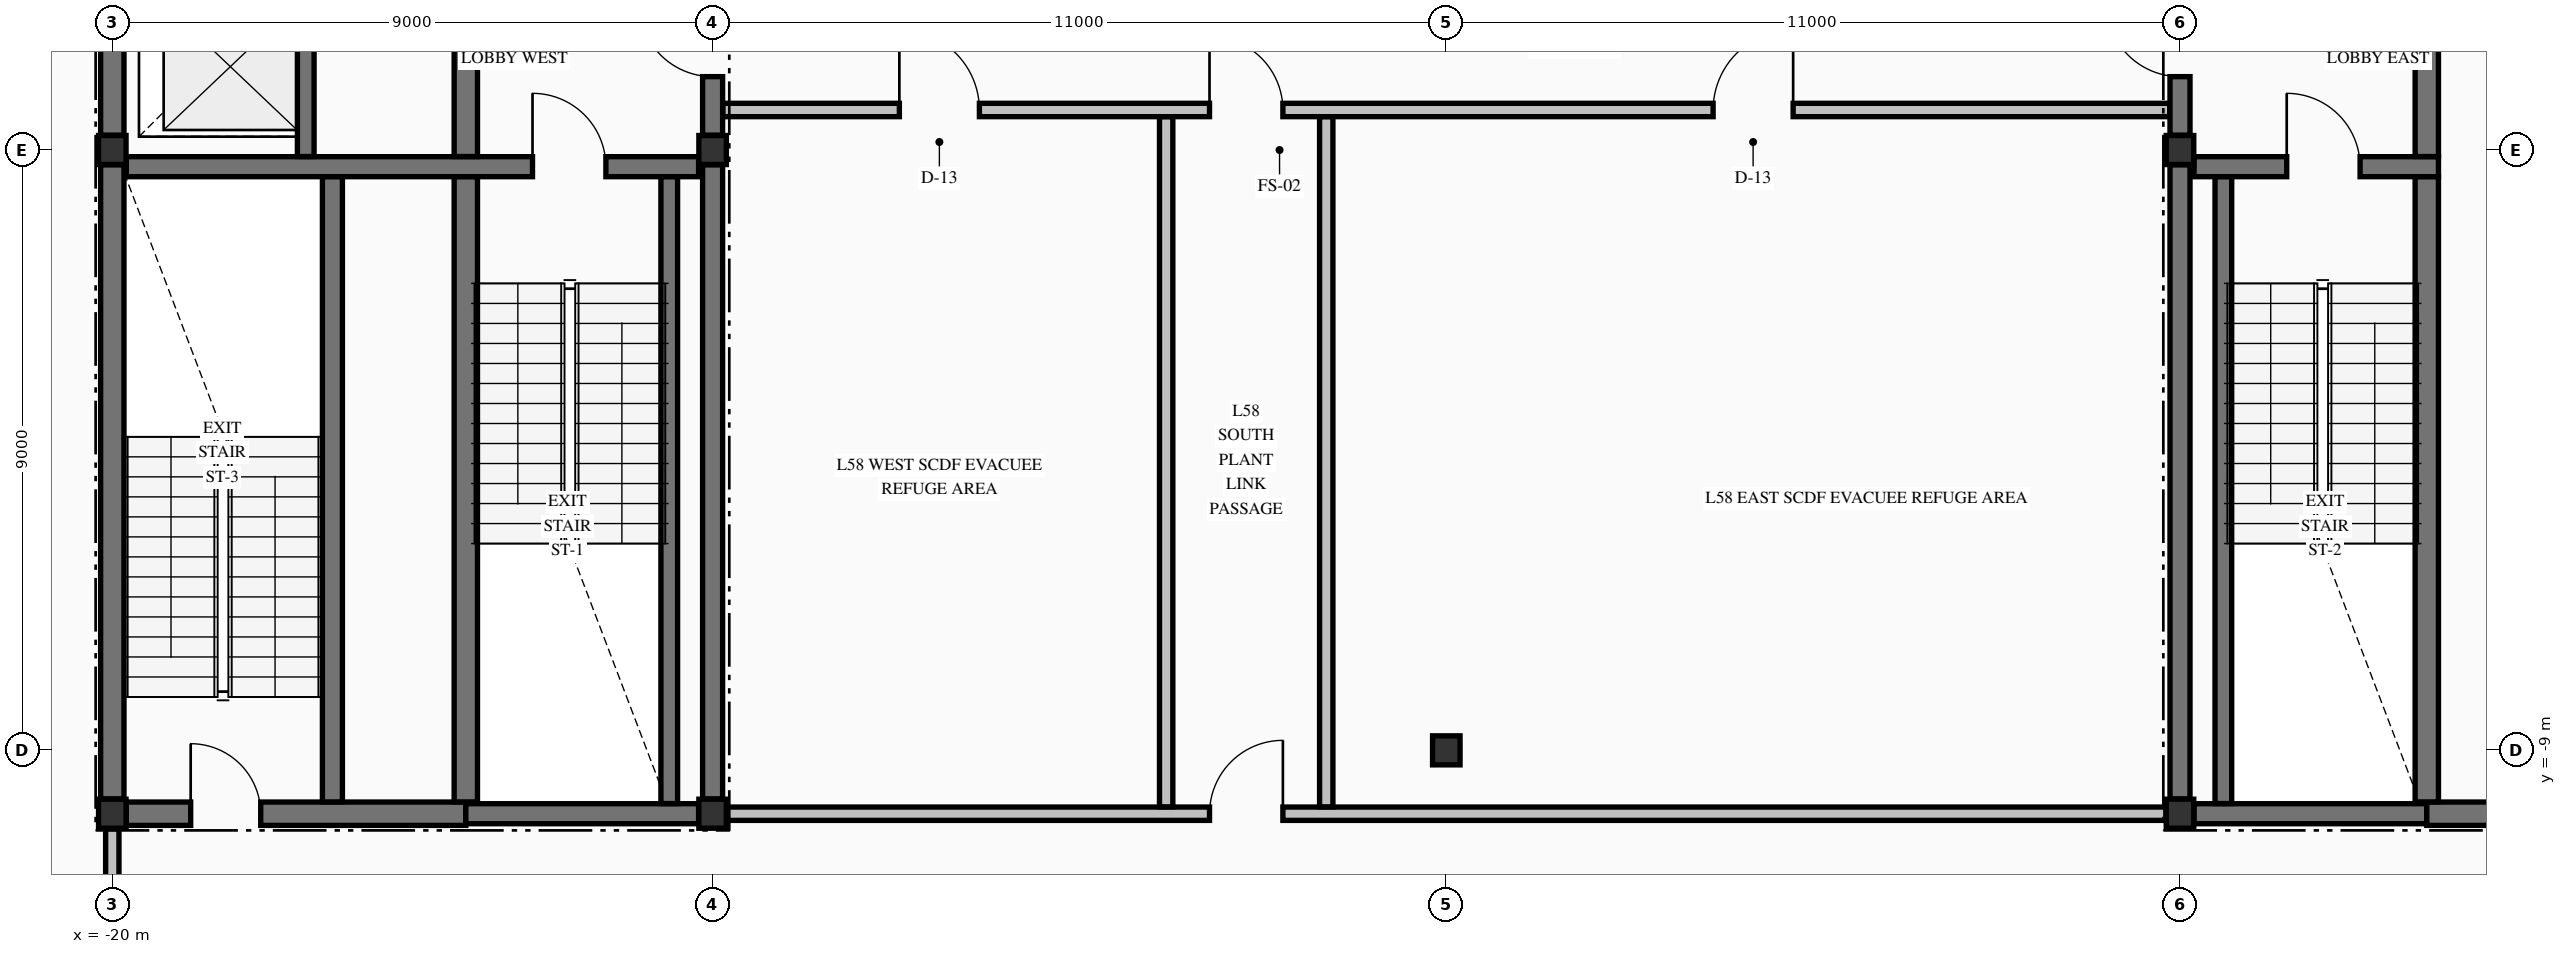
"""IFC4 building model, lengths in metres.
Left out: names, types, materials, properties, quantities, classifications, styles, units other than length and angle.
Written with IfcOpenShell. Run it as: python <this file> out.ifc"""

import sys

from ifc_helpers import new_model, si_unit, direction, frame, frame_2d, origin, origin_2d, place, context, subcontext, project, spatial, rectangle, i_section, extrude, element, fill, save


model = new_model("IFC4")
c1 = context("Model", 3, precision=1e-05, world=origin(), true_north=direction((0.0, 1.0)))
c2 = subcontext(c1, "Body", "Model", "MODEL_VIEW")
j1 = project(units=[si_unit("LENGTHUNIT", "METRE"), si_unit("PLANEANGLEUNIT", "RADIAN")], contexts=[c1])
p1 = place(None, origin())
s1 = spatial("IfcSite", under=j1, at=p1, CompositionType="ELEMENT")
p2 = place(p1, origin())
s2 = spatial("IfcBuilding", under=s1, at=p2, CompositionType="ELEMENT")
p3 = place(p2, frame((0.0, 0.0, 222.06)))
s3 = spatial("IfcBuildingStorey", under=s2, at=p3, CompositionType="ELEMENT", Elevation=222.06)
for number, where, z_axis, x_axis in (
    (1, (-20.0, -9.95, -0.425), (0.0, 0.0, 1.0), (1.0, 0.0, 0.0)),
    (2, (-11.0, -9.95, -0.425), (0.0, 0.0, 1.0), (1.0, 0.0, 0.0)),
    (3, (-11.0, 0.0, -0.425), (0.0, 0.0, 1.0), (1.0, 0.0, 0.0)),
    (4, (11.0, -9.95, -0.425), (0.0, 0.0, 1.0), (1.0, 0.0, 0.0)),
    (5, (11.0, 0.0, -0.425), (0.0, 0.0, 1.0), (1.0, 0.0, 0.0)),
    (6, (0.0, -9.0, -0.425), (0.0, 0.0, 1.0), (1.0, 0.0, 0.0)),
    (7, (-20.0, 0.0, -0.425), (0.0, 0.0, 1.0), (1.0, 0.0, 0.0)),
):
    element("IfcColumn", number, at=place(p3, frame(where, z_axis=z_axis, x_axis=x_axis)), inside=s3, PredefinedType="COLUMN", context=c2, shape_type="SweptSolid", body=[
        extrude(i_section(OverallWidth=0.412, OverallDepth=0.435, WebThickness=0.036, FlangeThickness=0.058, FilletRadius=0.015, at=origin_2d()), origin(), (0.0, 0.0, 1.0), 4.76),
    ])
p4 = place(p3, frame((-19.79, -9.95, 0.0), z_axis=(0.0, 0.0, 1.0), x_axis=(1.0, 0.0, 0.0)))
e8 = element("IfcWall", 8, at=p4, inside=s3, PredefinedType="SHEAR", context=c2, shape_type="SweptSolid", body=[
    extrude(rectangle(XDim=5.09, YDim=0.35, at=frame_2d((2.545, 0.0))), origin(), (0.0, 0.0, 1.0), 4.335),
])
p5 = place(p4, frame((0.965, 0.0, 0.0)))
e9 = element("IfcOpeningElement", 9, at=p5, cuts=e8, PredefinedType="OPENING", context=c2, shape_type="SweptSolid", body=[
    extrude(rectangle(XDim=1.05, YDim=2.15, at=frame_2d((0.525, 1.075))), frame((0.0, 0.185, 0.0), z_axis=(0.0, -1.0, 0.0), x_axis=(1.0, 0.0, 0.0)), (0.0, 0.0, 1.0), 0.37),
])
for number, where, z_axis, x_axis in (
    (10, (-14.7, -9.95, 0.0), (0.0, 0.0, 1.0), (1.0, 0.0, 0.0)),
    (11, (11.21, -9.95, 0.0), (0.0, 0.0, 1.0), (1.0, 0.0, 0.0)),
):
    element("IfcWall", number, at=place(p3, frame(where, z_axis=z_axis, x_axis=x_axis)), inside=s3, PredefinedType="SHEAR", context=c2, shape_type="SweptSolid", body=[
        extrude(rectangle(XDim=3.49, YDim=0.3, at=frame_2d((1.745, 0.0))), origin(), (0.0, 0.0, 1.0), 4.335),
    ])
p6 = place(p3, frame((14.7, -9.95, 0.0), z_axis=(0.0, 0.0, 1.0), x_axis=(1.0, 0.0, 0.0)))
e12 = element("IfcWall", 12, at=p6, inside=s3, PredefinedType="SHEAR", context=c2, shape_type="SweptSolid", body=[
    extrude(rectangle(XDim=5.09, YDim=0.35, at=frame_2d((2.545, 0.0))), origin(), (0.0, 0.0, 1.0), 4.335),
])
p7 = place(p6, frame((3.225, 0.0, 0.0)))
e13 = element("IfcOpeningElement", 13, at=p7, cuts=e12, PredefinedType="OPENING", context=c2, shape_type="SweptSolid", body=[
    extrude(rectangle(XDim=0.95, YDim=2.15, at=frame_2d((0.475, 1.075))), frame((0.0, 0.185, 0.0), z_axis=(0.0, -1.0, 0.0), x_axis=(1.0, 0.0, 0.0)), (0.0, 0.0, 1.0), 0.37),
])
p8 = place(p3, frame((-19.79, -0.25, 0.0), z_axis=(0.0, 0.0, 1.0), x_axis=(1.0, 0.0, 0.0)))
e14 = element("IfcWall", 14, at=p8, inside=s3, PredefinedType="SHEAR", context=c2, shape_type="SweptSolid", body=[
    extrude(rectangle(XDim=8.58, YDim=0.3, at=frame_2d((4.29, 0.0))), origin(), (0.0, 0.0, 1.0), 4.335),
])
p9 = place(p8, frame((6.09, 0.0, 0.0)))
e15 = element("IfcOpeningElement", 15, at=p9, cuts=e14, PredefinedType="OPENING", context=c2, shape_type="SweptSolid", body=[
    extrude(rectangle(XDim=1.1, YDim=2.15, at=frame_2d((0.55, 1.075))), frame((0.0, 0.16, 0.0), z_axis=(0.0, -1.0, 0.0), x_axis=(1.0, 0.0, 0.0)), (0.0, 0.0, 1.0), 0.32),
])
p10 = place(p3, frame((11.21, -0.25, 0.0), z_axis=(0.0, 0.0, 1.0), x_axis=(1.0, 0.0, 0.0)))
e16 = element("IfcWall", 16, at=p10, inside=s3, PredefinedType="SHEAR", context=c2, shape_type="SweptSolid", body=[
    extrude(rectangle(XDim=3.665, YDim=0.3, at=frame_2d((1.833, 0.0))), origin(), (0.0, 0.0, 1.0), 4.335),
])
p11 = place(p10, frame((1.39, 0.0, 0.0)))
e17 = element("IfcOpeningElement", 17, at=p11, cuts=e16, PredefinedType="OPENING", context=c2, shape_type="SweptSolid", body=[
    extrude(rectangle(XDim=1.1, YDim=2.15, at=frame_2d((0.55, 1.075))), frame((0.0, 0.16, 0.0), z_axis=(0.0, -1.0, 0.0), x_axis=(1.0, 0.0, 0.0)), (0.0, 0.0, 1.0), 0.32),
])
p12 = place(p3, frame((-10.788, -9.95, 0.0), z_axis=(0.0, 0.0, 1.0), x_axis=(1.0, 0.0, 0.0)))
e18 = element("IfcWall", 18, at=p12, inside=s3, PredefinedType="PARTITIONING", context=c2, shape_type="SweptSolid", body=[
    extrude(rectangle(XDim=21.576, YDim=0.2, at=frame_2d((10.788, 0.0))), origin(), (0.0, 0.0, 1.0), 4.335),
])
p13 = place(p12, frame((7.238, 0.0, 0.0)))
e19 = element("IfcOpeningElement", 19, at=p13, cuts=e18, PredefinedType="OPENING", context=c2, shape_type="SweptSolid", body=[
    extrude(rectangle(XDim=1.1, YDim=2.15, at=frame_2d((0.55, 1.075))), frame((0.0, 0.11, 0.0), z_axis=(0.0, -1.0, 0.0), x_axis=(1.0, 0.0, 0.0)), (0.0, 0.0, 1.0), 0.22),
])
p14 = place(p3, frame((-10.847, 0.6, 0.0), z_axis=(0.0, 0.0, 1.0), x_axis=(1.0, 0.0, 0.0)))
e20 = element("IfcWall", 20, at=p14, inside=s3, PredefinedType="PARTITIONING", context=c2, shape_type="SweptSolid", body=[
    extrude(rectangle(XDim=21.694, YDim=0.2, at=frame_2d((10.847, 0.0))), origin(), (0.0, 0.0, 1.0), 4.335),
])
p15 = place(p14, frame((7.297, 0.0, 0.0)))
e21 = element("IfcOpeningElement", 21, at=p15, cuts=e20, PredefinedType="OPENING", context=c2, shape_type="SweptSolid", body=[
    extrude(rectangle(XDim=1.1, YDim=2.15, at=frame_2d((0.55, 1.075))), frame((0.0, 0.11, 0.0), z_axis=(0.0, -1.0, 0.0), x_axis=(1.0, 0.0, 0.0)), (0.0, 0.0, 1.0), 0.22),
])
p16 = place(p14, frame((2.647, 0.0, 0.0)))
e22 = element("IfcOpeningElement", 22, at=p16, cuts=e20, PredefinedType="OPENING", context=c2, shape_type="SweptSolid", body=[
    extrude(rectangle(XDim=1.2, YDim=2.15, at=frame_2d((0.6, 1.075))), frame((0.0, 0.11, 0.0), z_axis=(0.0, -1.0, 0.0), x_axis=(1.0, 0.0, 0.0)), (0.0, 0.0, 1.0), 0.22),
])
p17 = place(p14, frame((14.847, 0.0, 0.0)))
e23 = element("IfcOpeningElement", 23, at=p17, cuts=e20, PredefinedType="OPENING", context=c2, shape_type="SweptSolid", body=[
    extrude(rectangle(XDim=1.2, YDim=2.15, at=frame_2d((0.6, 1.075))), frame((0.0, 0.11, 0.0), z_axis=(0.0, -1.0, 0.0), x_axis=(1.0, 0.0, 0.0)), (0.0, 0.0, 1.0), 0.22),
])
p18 = place(p3, frame((-20.0, -9.729, 0.0), z_axis=(0.0, 0.0, 1.0), x_axis=(0.0, 1.0, 0.0)))
e24 = element("IfcWall", 24, at=p18, inside=s3, PredefinedType="SHEAR", context=c2, shape_type="SweptSolid", body=[
    extrude(rectangle(XDim=9.507, YDim=0.35, at=frame_2d((4.753, 0.0))), origin(), (0.0, 0.0, 1.0), 4.335),
])
p19 = place(p3, frame((-20.0, 0.221, 0.0), z_axis=(0.0, 0.0, 1.0), x_axis=(0.0, 1.0, 0.0)))
e25 = element("IfcWall", 25, at=p19, inside=s3, PredefinedType="SHEAR", context=c2, shape_type="SweptSolid", body=[
    extrude(rectangle(XDim=2.302, YDim=0.35, at=frame_2d((1.151, 0.0))), origin(), (0.0, 0.0, 1.0), 4.335),
])
p20 = place(p3, frame((-17.1, -0.098, 0.0), z_axis=(0.0, 0.0, 1.0), x_axis=(0.0, 1.0, 0.0)))
e26 = element("IfcWall", 26, at=p20, inside=s3, PredefinedType="SOLIDWALL", context=c2, shape_type="SweptSolid", body=[
    extrude(rectangle(XDim=2.621, YDim=0.25, at=frame_2d((1.311, 0.0))), origin(), (0.0, 0.0, 1.0), 4.335),
])
p21 = place(p3, frame((-16.7, -9.773, 0.0), z_axis=(0.0, 0.0, 1.0), x_axis=(0.0, 1.0, 0.0)))
e27 = element("IfcWall", 27, at=p21, inside=s3, PredefinedType="SHEAR", context=c2, shape_type="SweptSolid", body=[
    extrude(rectangle(XDim=9.371, YDim=0.3, at=frame_2d((4.686, 0.0))), origin(), (0.0, 0.0, 1.0), 4.335),
])
p22 = place(p3, frame((-14.7, -9.773, 0.0), z_axis=(0.0, 0.0, 1.0), x_axis=(0.0, 1.0, 0.0)))
e28 = element("IfcWall", 28, at=p22, inside=s3, PredefinedType="SHEAR", context=c2, shape_type="SweptSolid", body=[
    extrude(rectangle(XDim=9.371, YDim=0.35, at=frame_2d((4.686, 0.0))), origin(), (0.0, 0.0, 1.0), 4.335),
])
p23 = place(p3, frame((-14.7, -0.098, 0.0), z_axis=(0.0, 0.0, 1.0), x_axis=(0.0, 1.0, 0.0)))
e29 = element("IfcWall", 29, at=p23, inside=s3, PredefinedType="SHEAR", context=c2, shape_type="SweptSolid", body=[
    extrude(rectangle(XDim=2.846, YDim=0.35, at=frame_2d((1.423, 0.0))), origin(), (0.0, 0.0, 1.0), 4.335),
])
p24 = place(p3, frame((-11.65, -9.798, 0.0), z_axis=(0.0, 0.0, 1.0), x_axis=(0.0, 1.0, 0.0)))
e30 = element("IfcWall", 30, at=p24, inside=s3, PredefinedType="SOLIDWALL", context=c2, shape_type="SweptSolid", body=[
    extrude(rectangle(XDim=9.396, YDim=0.25, at=frame_2d((4.698, 0.0))), origin(), (0.0, 0.0, 1.0), 4.335),
])
p25 = place(p3, frame((-11.0, -9.729, 0.0), z_axis=(0.0, 0.0, 1.0), x_axis=(0.0, 1.0, 0.0)))
e31 = element("IfcWall", 31, at=p25, inside=s3, PredefinedType="SHEAR", context=c2, shape_type="SweptSolid", body=[
    extrude(rectangle(XDim=9.507, YDim=0.3, at=frame_2d((4.753, 0.0))), origin(), (0.0, 0.0, 1.0), 4.335),
])
p26 = place(p3, frame((-11.0, 0.221, 0.0), z_axis=(0.0, 0.0, 1.0), x_axis=(0.0, 1.0, 0.0)))
e32 = element("IfcWall", 32, at=p26, inside=s3, PredefinedType="SHEAR", context=c2, shape_type="SweptSolid", body=[
    extrude(rectangle(XDim=2.527, YDim=0.3, at=frame_2d((1.263, 0.0))), origin(), (0.0, 0.0, 1.0), 4.335),
])
p27 = place(p26, frame((0.878, 0.0, 0.0)))
e33 = element("IfcOpeningElement", 33, at=p27, cuts=e32, PredefinedType="OPENING", context=c2, shape_type="SweptSolid", body=[
    extrude(rectangle(XDim=1.1, YDim=2.15, at=frame_2d((0.55, 1.075))), frame((0.0, 0.16, 0.0), z_axis=(0.0, -1.0, 0.0), x_axis=(1.0, 0.0, 0.0)), (0.0, 0.0, 1.0), 0.32),
])
p28 = place(p3, frame((11.0, -9.729, 0.0), z_axis=(0.0, 0.0, 1.0), x_axis=(0.0, 1.0, 0.0)))
e34 = element("IfcWall", 34, at=p28, inside=s3, PredefinedType="SHEAR", context=c2, shape_type="SweptSolid", body=[
    extrude(rectangle(XDim=9.507, YDim=0.3, at=frame_2d((4.753, 0.0))), origin(), (0.0, 0.0, 1.0), 4.335),
])
p29 = place(p3, frame((11.0, 0.221, 0.0), z_axis=(0.0, 0.0, 1.0), x_axis=(0.0, 1.0, 0.0)))
e35 = element("IfcWall", 35, at=p29, inside=s3, PredefinedType="SHEAR", context=c2, shape_type="SweptSolid", body=[
    extrude(rectangle(XDim=2.527, YDim=0.3, at=frame_2d((1.263, 0.0))), origin(), (0.0, 0.0, 1.0), 4.335),
])
p30 = place(p29, frame((0.878, 0.0, 0.0)))
e36 = element("IfcOpeningElement", 36, at=p30, cuts=e35, PredefinedType="OPENING", context=c2, shape_type="SweptSolid", body=[
    extrude(rectangle(XDim=1.1, YDim=2.15, at=frame_2d((0.55, 1.075))), frame((0.0, 0.16, 0.0), z_axis=(0.0, -1.0, 0.0), x_axis=(1.0, 0.0, 0.0)), (0.0, 0.0, 1.0), 0.32),
])
p31 = place(p3, frame((11.65, -9.798, 0.0), z_axis=(0.0, 0.0, 1.0), x_axis=(0.0, 1.0, 0.0)))
e37 = element("IfcWall", 37, at=p31, inside=s3, PredefinedType="SOLIDWALL", context=c2, shape_type="SweptSolid", body=[
    extrude(rectangle(XDim=9.396, YDim=0.25, at=frame_2d((4.698, 0.0))), origin(), (0.0, 0.0, 1.0), 4.335),
])
p32 = place(p3, frame((14.7, -9.773, 0.0), z_axis=(0.0, 0.0, 1.0), x_axis=(0.0, 1.0, 0.0)))
e38 = element("IfcWall", 38, at=p32, inside=s3, PredefinedType="SHEAR", context=c2, shape_type="SweptSolid", body=[
    extrude(rectangle(XDim=9.371, YDim=0.35, at=frame_2d((4.686, 0.0))), origin(), (0.0, 0.0, 1.0), 4.335),
])
p33 = place(p3, frame((14.7, -0.098, 0.0), z_axis=(0.0, 0.0, 1.0), x_axis=(0.0, 1.0, 0.0)))
e39 = element("IfcWall", 39, at=p33, inside=s3, PredefinedType="SHEAR", context=c2, shape_type="SweptSolid", body=[
    extrude(rectangle(XDim=2.846, YDim=0.35, at=frame_2d((1.423, 0.0))), origin(), (0.0, 0.0, 1.0), 4.335),
])
p34 = place(p3, frame((-20.0, -12.697, 0.0), z_axis=(0.0, 0.0, 1.0), x_axis=(0.0, 1.0, 0.0)))
e40 = element("IfcWall", 40, at=p34, inside=s3, PredefinedType="PARTITIONING", context=c2, shape_type="SweptSolid", body=[
    extrude(rectangle(XDim=2.523, YDim=0.2, at=frame_2d((1.262, 0.0))), origin(), (0.0, 0.0, 1.0), 1.927),
])
for number, where, z_axis, x_axis in (
    (41, (-4.2, -9.847, 0.0), (0.0, 0.0, 1.0), (0.0, 1.0, 0.0)),
    (42, (-1.8, -9.847, 0.0), (0.0, 0.0, 1.0), (0.0, 1.0, 0.0)),
):
    element("IfcWall", number, at=place(p3, frame(where, z_axis=z_axis, x_axis=x_axis)), inside=s3, PredefinedType="PARTITIONING", context=c2, shape_type="SweptSolid", body=[
        extrude(rectangle(XDim=10.344, YDim=0.2, at=frame_2d((5.172, 0.0))), origin(), (0.0, 0.0, 1.0), 4.335),
    ])
p35 = place(p9, origin())
e43 = element("IfcDoor", 43, at=p35, inside=s3, OperationType="SINGLE_SWING_LEFT", PredefinedType="DOOR", context=c2, shape_type="SweptSolid", body=[
    extrude(rectangle(XDim=1.1, YDim=2.15, at=frame_2d((0.55, 1.075))), frame((0.0, 0.025, 0.0), z_axis=(0.0, -1.0, 0.0), x_axis=(1.0, 0.0, 0.0)), (0.0, 0.0, 1.0), 0.05),
])
fill(e15, e43)
p36 = place(p27, origin())
e44 = element("IfcDoor", 44, at=p36, inside=s3, OperationType="SINGLE_SWING_RIGHT", PredefinedType="DOOR", context=c2, shape_type="SweptSolid", body=[
    extrude(rectangle(XDim=1.1, YDim=2.15, at=frame_2d((0.55, 1.075))), frame((0.0, 0.025, 0.0), z_axis=(0.0, -1.0, 0.0), x_axis=(1.0, 0.0, 0.0)), (0.0, 0.0, 1.0), 0.05),
])
fill(e33, e44)
p37 = place(p11, origin())
e45 = element("IfcDoor", 45, at=p37, inside=s3, OperationType="SINGLE_SWING_LEFT", PredefinedType="DOOR", context=c2, shape_type="SweptSolid", body=[
    extrude(rectangle(XDim=1.1, YDim=2.15, at=frame_2d((0.55, 1.075))), frame((0.0, 0.025, 0.0), z_axis=(0.0, -1.0, 0.0), x_axis=(1.0, 0.0, 0.0)), (0.0, 0.0, 1.0), 0.05),
])
fill(e17, e45)
p38 = place(p30, origin())
e46 = element("IfcDoor", 46, at=p38, inside=s3, OperationType="SINGLE_SWING_RIGHT", PredefinedType="DOOR", context=c2, shape_type="SweptSolid", body=[
    extrude(rectangle(XDim=1.1, YDim=2.15, at=frame_2d((0.55, 1.075))), frame((0.0, 0.025, 0.0), z_axis=(0.0, -1.0, 0.0), x_axis=(1.0, 0.0, 0.0)), (0.0, 0.0, 1.0), 0.05),
])
fill(e36, e46)
p39 = place(p5, origin())
e47 = element("IfcDoor", 47, at=p39, inside=s3, OperationType="SINGLE_SWING_LEFT", PredefinedType="DOOR", context=c2, shape_type="SweptSolid", body=[
    extrude(rectangle(XDim=1.05, YDim=2.15, at=frame_2d((0.525, 1.075))), frame((0.0, 0.025, 0.0), z_axis=(0.0, -1.0, 0.0), x_axis=(1.0, 0.0, 0.0)), (0.0, 0.0, 1.0), 0.05),
])
fill(e9, e47)
p40 = place(p15, origin())
e48 = element("IfcDoor", 48, at=p40, inside=s3, OperationType="SINGLE_SWING_LEFT", PredefinedType="DOOR", context=c2, shape_type="SweptSolid", body=[
    extrude(rectangle(XDim=1.1, YDim=2.15, at=frame_2d((0.55, 1.075))), frame((0.0, 0.025, 0.0), z_axis=(0.0, -1.0, 0.0), x_axis=(1.0, 0.0, 0.0)), (0.0, 0.0, 1.0), 0.05),
])
fill(e21, e48)
p41 = place(p13, origin())
e49 = element("IfcDoor", 49, at=p41, inside=s3, OperationType="SINGLE_SWING_RIGHT", PredefinedType="DOOR", context=c2, shape_type="SweptSolid", body=[
    extrude(rectangle(XDim=1.1, YDim=2.15, at=frame_2d((0.55, 1.075))), frame((0.0, 0.025, 0.0), z_axis=(0.0, -1.0, 0.0), x_axis=(1.0, 0.0, 0.0)), (0.0, 0.0, 1.0), 0.05),
])
fill(e19, e49)
p42 = place(p16, origin())
e50 = element("IfcDoor", 50, at=p42, inside=s3, OperationType="SINGLE_SWING_LEFT", PredefinedType="DOOR", context=c2, shape_type="SweptSolid", body=[
    extrude(rectangle(XDim=1.2, YDim=2.15, at=frame_2d((0.6, 1.075))), frame((0.0, 0.025, 0.0), z_axis=(0.0, -1.0, 0.0), x_axis=(1.0, 0.0, 0.0)), (0.0, 0.0, 1.0), 0.05),
])
fill(e22, e50)
p43 = place(p17, origin())
e51 = element("IfcDoor", 51, at=p43, inside=s3, OperationType="SINGLE_SWING_RIGHT", PredefinedType="DOOR", context=c2, shape_type="SweptSolid", body=[
    extrude(rectangle(XDim=1.2, YDim=2.15, at=frame_2d((0.6, 1.075))), frame((0.0, 0.025, 0.0), z_axis=(0.0, -1.0, 0.0), x_axis=(1.0, 0.0, 0.0)), (0.0, 0.0, 1.0), 0.05),
])
fill(e23, e51)
save(model, sys.argv[1])
